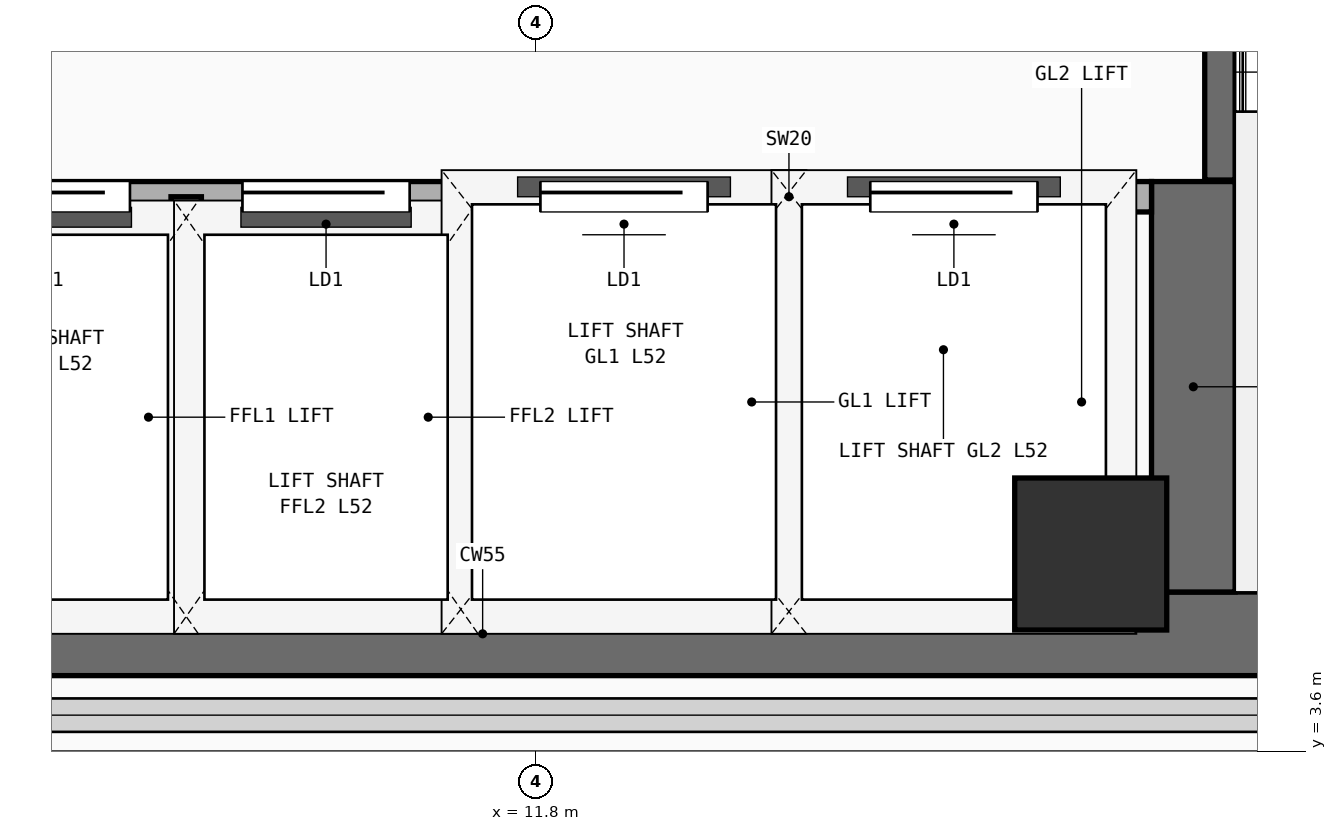
"""IFC4 building model, lengths in metres.
Left out: names, types, materials, properties, quantities, classifications, styles, units other than length and angle.
Written with IfcOpenShell. Run it as: python <this file> out.ifc"""

import sys

from ifc_helpers import new_model, si_unit, direction, frame, frame_2d, origin, origin_2d, place, context, subcontext, project, spatial, rectangle, extrude, element, fill, save


model = new_model("IFC4")
c1 = context("Model", 3, precision=1e-05, world=origin(), true_north=direction((0.0, 1.0)))
c2 = subcontext(c1, "Body", "Model", "MODEL_VIEW")
j1 = project(units=[si_unit("LENGTHUNIT", "METRE"), si_unit("PLANEANGLEUNIT", "RADIAN")], contexts=[c1])
p1 = place(None, origin())
s1 = spatial("IfcSite", under=j1, at=p1, CompositionType="ELEMENT")
p2 = place(p1, origin())
s2 = spatial("IfcBuilding", under=s1, at=p2, CompositionType="ELEMENT")
p3 = place(p2, frame((0.0, 0.0, 204.5)))
s3 = spatial("IfcBuildingStorey", under=s2, at=p3, CompositionType="ELEMENT", Elevation=204.5)
p4 = place(p3, frame((7.175, 4.375, 0.0), z_axis=(0.0, 0.0, 1.0), x_axis=(1.0, 0.0, 0.0)))
e1 = element("IfcWall", 1, at=p4, inside=s3, PredefinedType="SHEAR", context=c2, shape_type="SweptSolid", body=[
    extrude(rectangle(XDim=13.9, YDim=0.55, at=frame_2d((6.95, 0.0))), origin(), (0.0, 0.0, 1.0), 3.56),
])
p5 = place(p3, frame((16.125, 4.65, 0.0), z_axis=(0.0, 0.0, 1.0), x_axis=(0.0, 1.0, 0.0)))
e2 = element("IfcWall", 2, at=p5, inside=s3, PredefinedType="SHEAR", context=c2, shape_type="SweptSolid", body=[
    extrude(rectangle(XDim=2.7, YDim=0.55, at=frame_2d((1.35, 0.0))), origin(), (0.0, 0.0, 1.0), 3.56),
])
p6 = place(p3, frame((15.45, 4.9, 0.0), z_axis=(0.0, 0.0, 1.0), x_axis=(1.0, 0.0, 0.0)))
e3 = element("IfcColumn", 3, at=p6, inside=s3, PredefinedType="COLUMN", context=c2, shape_type="SweptSolid", body=[
    extrude(rectangle(XDim=1.0, YDim=1.0, at=origin_2d()), origin(), (0.0, 0.0, 1.0), 3.56),
])
p7 = place(p3, frame((16.3, 7.36, 0.0), z_axis=(0.0, 0.0, 1.0), x_axis=(0.0, 1.0, 0.0)))
e4 = element("IfcWall", 4, at=p7, inside=s3, PredefinedType="SHEAR", context=c2, shape_type="SweptSolid", body=[
    extrude(rectangle(XDim=2.58, YDim=0.2, at=frame_2d((1.29, 0.0))), origin(), (0.0, 0.0, 1.0), 3.56),
])
p8 = place(p3, frame((7.5, 7.25, 0.0), z_axis=(0.0, 0.0, 1.0), x_axis=(1.0, 0.0, 0.0)))
e5 = element("IfcWall", 5, at=p8, inside=s3, PredefinedType="PARTITIONING", context=c2, shape_type="SweptSolid", body=[
    extrude(rectangle(XDim=8.35, YDim=0.2, at=frame_2d((4.175, 0.0))), origin(), (0.0, 0.0, 1.0), 3.56),
])
p9 = place(p8, frame((0.53, 0.0, 0.0)))
e6 = element("IfcOpeningElement", 6, at=p9, cuts=e5, PredefinedType="OPENING", context=c2, shape_type="SweptSolid", body=[
    extrude(rectangle(XDim=1.1, YDim=2.2, at=frame_2d((0.55, 1.1))), frame((0.0, 0.11, 0.0), z_axis=(0.0, -1.0, 0.0), x_axis=(1.0, 0.0, 0.0)), (0.0, 0.0, 1.0), 0.22),
])
p10 = place(p8, frame((2.37, 0.0, 0.0)))
e7 = element("IfcOpeningElement", 7, at=p10, cuts=e5, PredefinedType="OPENING", context=c2, shape_type="SweptSolid", body=[
    extrude(rectangle(XDim=1.1, YDim=2.2, at=frame_2d((0.55, 1.1))), frame((0.0, 0.11, 0.0), z_axis=(0.0, -1.0, 0.0), x_axis=(1.0, 0.0, 0.0)), (0.0, 0.0, 1.0), 0.22),
])
p11 = place(p8, frame((4.33, 0.0, 0.0)))
e8 = element("IfcOpeningElement", 8, at=p11, cuts=e5, PredefinedType="OPENING", context=c2, shape_type="SweptSolid", body=[
    extrude(rectangle(XDim=1.1, YDim=2.2, at=frame_2d((0.55, 1.1))), frame((0.0, 0.11, 0.0), z_axis=(0.0, -1.0, 0.0), x_axis=(1.0, 0.0, 0.0)), (0.0, 0.0, 1.0), 0.22),
])
p12 = place(p8, frame((6.5, 0.0, 0.0)))
e9 = element("IfcOpeningElement", 9, at=p12, cuts=e5, PredefinedType="OPENING", context=c2, shape_type="SweptSolid", body=[
    extrude(rectangle(XDim=1.1, YDim=2.2, at=frame_2d((0.55, 1.1))), frame((0.0, 0.11, 0.0), z_axis=(0.0, -1.0, 0.0), x_axis=(1.0, 0.0, 0.0)), (0.0, 0.0, 1.0), 0.22),
])
for number, where, z_axis, x_axis in (
    (10, (9.5, 4.45, 0.0), (0.0, 0.0, 1.0), (0.0, 1.0, 0.0)),
    (11, (11.36, 4.45, 0.0), (0.0, 0.0, 1.0), (0.0, 1.0, 0.0)),
    (12, (13.46, 4.45, 0.0), (0.0, 0.0, 1.0), (0.0, 1.0, 0.0)),
):
    element("IfcWall", number, at=place(p3, frame(where, z_axis=z_axis, x_axis=x_axis)), inside=s3, PredefinedType="PARTITIONING", context=c2, shape_type="SweptSolid", body=[
        extrude(rectangle(XDim=2.8, YDim=0.2, at=frame_2d((1.4, 0.0))), origin(), (0.0, 0.0, 1.0), 3.56),
    ])
p13 = place(p9, origin())
e13 = element("IfcDoor", 13, at=p13, inside=s3, OperationType="SLIDING_TO_LEFT", PredefinedType="DOOR", context=c2, shape_type="SweptSolid", body=[
    extrude(rectangle(XDim=1.1, YDim=2.2, at=frame_2d((0.55, 1.1))), frame((0.0, 0.025, 0.0), z_axis=(0.0, -1.0, 0.0), x_axis=(1.0, 0.0, 0.0)), (0.0, 0.0, 1.0), 0.05),
])
fill(e6, e13)
p14 = place(p10, origin())
e14 = element("IfcDoor", 14, at=p14, inside=s3, OperationType="SLIDING_TO_LEFT", PredefinedType="DOOR", context=c2, shape_type="SweptSolid", body=[
    extrude(rectangle(XDim=1.1, YDim=2.2, at=frame_2d((0.55, 1.1))), frame((0.0, 0.025, 0.0), z_axis=(0.0, -1.0, 0.0), x_axis=(1.0, 0.0, 0.0)), (0.0, 0.0, 1.0), 0.05),
])
fill(e7, e14)
p15 = place(p11, origin())
e15 = element("IfcDoor", 15, at=p15, inside=s3, OperationType="SLIDING_TO_LEFT", PredefinedType="DOOR", context=c2, shape_type="SweptSolid", body=[
    extrude(rectangle(XDim=1.1, YDim=2.2, at=frame_2d((0.55, 1.1))), frame((0.0, 0.025, 0.0), z_axis=(0.0, -1.0, 0.0), x_axis=(1.0, 0.0, 0.0)), (0.0, 0.0, 1.0), 0.05),
])
fill(e8, e15)
p16 = place(p12, origin())
e16 = element("IfcDoor", 16, at=p16, inside=s3, OperationType="SLIDING_TO_LEFT", PredefinedType="DOOR", context=c2, shape_type="SweptSolid", body=[
    extrude(rectangle(XDim=1.1, YDim=2.2, at=frame_2d((0.55, 1.1))), frame((0.0, 0.025, 0.0), z_axis=(0.0, -1.0, 0.0), x_axis=(1.0, 0.0, 0.0)), (0.0, 0.0, 1.0), 0.05),
])
fill(e9, e16)
save(model, sys.argv[1])
